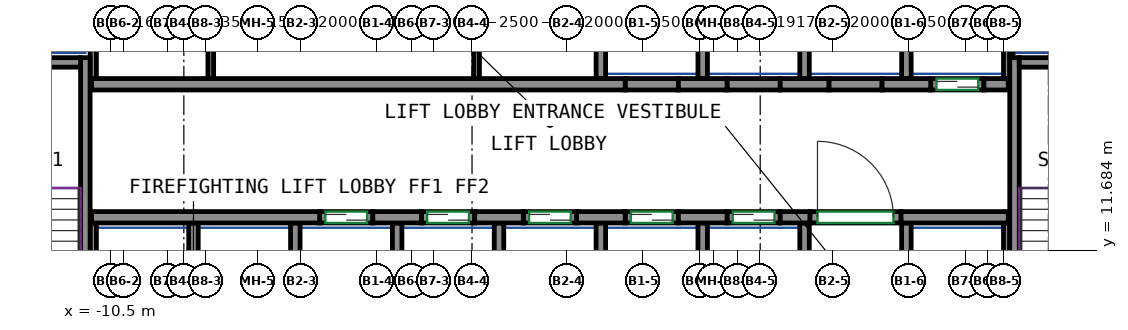
"""IFC4 building model, lengths in metres.
Left out: names, types, materials, properties, quantities, classifications, styles, units other than length and angle.
Written with IfcOpenShell. Run it as: python <this file> out.ifc"""

import sys

from ifc_helpers import new_model, si_unit, direction, frame, frame_2d, origin, place, context, subcontext, project, spatial, rectangle, extrude, source, transform, mapped, element, fill, save


model = new_model("IFC4")
c1 = context("Model", 3, precision=1e-05, world=origin(), true_north=direction((0.0, 1.0)))
c2 = subcontext(c1, "Body", "Model", "MODEL_VIEW")
j1 = project(units=[si_unit("LENGTHUNIT", "METRE"), si_unit("PLANEANGLEUNIT", "RADIAN")], contexts=[c1])
p1 = place(None, origin())
s1 = spatial("IfcSite", under=j1, at=p1, CompositionType="ELEMENT")
p2 = place(p1, origin())
s2 = spatial("IfcBuilding", under=s1, at=p2, CompositionType="ELEMENT")
p3 = place(p2, frame((0.0, 0.0, 185.5)))
s3 = spatial("IfcBuildingStorey", under=s2, at=p3, CompositionType="ELEMENT", Elevation=185.5)
m1 = source(origin(), c2, "Body", "SweptSolid", [
    extrude(rectangle(XDim=7.75, YDim=0.25, at=frame_2d((3.875, 0.0))), origin(), (0.0, 0.0, 1.0), 3.12),
])
p4 = place(p3, frame((-11.175, 9.0, 0.0), z_axis=(0.0, 0.0, 1.0), x_axis=(0.0, 1.0, 0.0)))
e1 = element("IfcWall", 1, at=p4, inside=s3, PredefinedType="SHEAR", context=c2, shape_type="MappedRepresentation", body=[
    mapped(m1, transform((0.0, 0.0, 0.0))),
])
m2 = source(origin(), c2, "Body", "SweptSolid", [
    extrude(rectangle(XDim=3.7, YDim=0.25, at=frame_2d((1.85, 0.0))), origin(), (0.0, 0.0, 1.0), 3.12),
])
p5 = place(p3, frame((-15.0, 16.625, 0.0), z_axis=(0.0, 0.0, 1.0), x_axis=(1.0, 0.0, 0.0)))
e2 = element("IfcWall", 2, at=p5, inside=s3, PredefinedType="SHEAR", context=c2, shape_type="MappedRepresentation", body=[
    mapped(m2, transform((0.0, 0.0, 0.0))),
])
p6 = place(p3, frame((13.275, 9.0, 0.0), z_axis=(0.0, 0.0, 1.0), x_axis=(0.0, 1.0, 0.0)))
e3 = element("IfcWall", 3, at=p6, inside=s3, PredefinedType="SHEAR", context=c2, shape_type="MappedRepresentation", body=[
    mapped(m1, transform((0.0, 0.0, 0.0))),
])
m3 = source(origin(), c2, "Body", "SweptSolid", [
    extrude(rectangle(XDim=3.7, YDim=0.25, at=frame_2d((1.85, 0.0))), origin(), (0.0, 0.0, 1.0), 3.12),
])
p7 = place(p3, frame((13.4, 16.625, 0.0), z_axis=(0.0, 0.0, 1.0), x_axis=(1.0, 0.0, 0.0)))
e4 = element("IfcWall", 4, at=p7, inside=s3, PredefinedType="SHEAR", context=c2, shape_type="MappedRepresentation", body=[
    mapped(m3, transform((0.0, 0.0, 0.0))),
])
m4 = source(origin(), c2, "Body", "SweptSolid", [
    extrude(rectangle(XDim=6.0, YDim=0.3, at=frame_2d((3.0, 0.0))), origin(), (0.0, 0.0, 1.0), 3.12),
])
p8 = place(p3, frame((-11.01, 12.55, 0.0), z_axis=(0.0, 0.0, 1.0), x_axis=(1.0, 0.0, 0.0)))
e5 = element("IfcWall", 5, at=p8, inside=s3, PredefinedType="SHEAR", context=c2, shape_type="MappedRepresentation", body=[
    mapped(m4, transform((0.0, 0.0, 0.0))),
])
m5 = source(origin(), c2, "Body", "SweptSolid", [
    extrude(rectangle(XDim=1.28, YDim=0.3, at=frame_2d((0.64, 0.0))), origin(), (0.0, 0.0, 1.0), 3.12),
])
for number, where, z_axis, x_axis in (
    (6, (-3.61, 12.55, 0.0), (0.0, 0.0, 1.0), (1.0, 0.0, 0.0)),
    (7, (-0.93, 12.55, 0.0), (0.0, 0.0, 1.0), (1.0, 0.0, 0.0)),
    (8, (1.75, 12.55, 0.0), (0.0, 0.0, 1.0), (1.0, 0.0, 0.0)),
    (9, (4.43, 12.55, 0.0), (0.0, 0.0, 1.0), (1.0, 0.0, 0.0)),
):
    element("IfcWall", number, at=place(p3, frame(where, z_axis=z_axis, x_axis=x_axis)), inside=s3, PredefinedType="SHEAR", context=c2, shape_type="MappedRepresentation", body=[
        mapped(m5, transform((0.0, 0.0, 0.0))),
    ])
m6 = source(origin(), c2, "Body", "SweptSolid", [
    extrude(rectangle(XDim=0.78, YDim=0.3, at=frame_2d((0.39, 0.0))), origin(), (0.0, 0.0, 1.0), 3.12),
])
p9 = place(p3, frame((7.11, 12.55, 0.0), z_axis=(0.0, 0.0, 1.0), x_axis=(1.0, 0.0, 0.0)))
e10 = element("IfcWall", 10, at=p9, inside=s3, PredefinedType="SHEAR", context=c2, shape_type="MappedRepresentation", body=[
    mapped(m6, transform((0.0, 0.0, 0.0))),
])
m7 = source(origin(), c2, "Body", "SweptSolid", [
    extrude(rectangle(XDim=2.82, YDim=0.3, at=frame_2d((1.41, 0.0))), origin(), (0.0, 0.0, 1.0), 3.12),
])
p10 = place(p3, frame((10.29, 12.55, 0.0), z_axis=(0.0, 0.0, 1.0), x_axis=(1.0, 0.0, 0.0)))
e11 = element("IfcWall", 11, at=p10, inside=s3, PredefinedType="SHEAR", context=c2, shape_type="MappedRepresentation", body=[
    mapped(m7, transform((0.0, 0.0, 0.0))),
])
m8 = source(origin(), c2, "Body", "SweptSolid", [
    extrude(rectangle(XDim=14.04, YDim=0.3, at=frame_2d((7.02, 0.0))), origin(), (0.0, 0.0, 1.0), 3.12),
])
p11 = place(p3, frame((-11.01, 16.05, 0.0), z_axis=(0.0, 0.0, 1.0), x_axis=(1.0, 0.0, 0.0)))
e12 = element("IfcWall", 12, at=p11, inside=s3, PredefinedType="SHEAR", context=c2, shape_type="MappedRepresentation", body=[
    mapped(m8, transform((0.0, 0.0, 0.0))),
])
p12 = place(p3, frame((4.43, 16.05, 0.0), z_axis=(0.0, 0.0, 1.0), x_axis=(1.0, 0.0, 0.0)))
e13 = element("IfcWall", 13, at=p12, inside=s3, PredefinedType="SHEAR", context=c2, shape_type="MappedRepresentation", body=[
    mapped(m5, transform((0.0, 0.0, 0.0))),
])
m9 = source(origin(), c2, "Body", "SweptSolid", [
    extrude(rectangle(XDim=1.28, YDim=0.3, at=frame_2d((0.64, 0.0))), origin(), (0.0, 0.0, 1.0), 3.12),
])
p13 = place(p3, frame((7.11, 16.05, 0.0), z_axis=(0.0, 0.0, 1.0), x_axis=(1.0, 0.0, 0.0)))
e14 = element("IfcWall", 14, at=p13, inside=s3, PredefinedType="SHEAR", context=c2, shape_type="MappedRepresentation", body=[
    mapped(m9, transform((0.0, 0.0, 0.0))),
])
p14 = place(p3, frame((9.79, 16.05, 0.0), z_axis=(0.0, 0.0, 1.0), x_axis=(1.0, 0.0, 0.0)))
e15 = element("IfcWall", 15, at=p14, inside=s3, PredefinedType="SHEAR", context=c2, shape_type="MappedRepresentation", body=[
    mapped(m5, transform((0.0, 0.0, 0.0))),
])
m10 = source(origin(), c2, "Body", "SweptSolid", [
    extrude(rectangle(XDim=0.64, YDim=0.3, at=frame_2d((0.32, 0.0))), origin(), (0.0, 0.0, 1.0), 3.12),
])
p15 = place(p3, frame((12.47, 16.05, 0.0), z_axis=(0.0, 0.0, 1.0), x_axis=(1.0, 0.0, 0.0)))
e16 = element("IfcWall", 16, at=p15, inside=s3, PredefinedType="SHEAR", context=c2, shape_type="MappedRepresentation", body=[
    mapped(m10, transform((0.0, 0.0, 0.0))),
])
m11 = source(origin(), c2, "Body", "SweptSolid", [
    extrude(rectangle(XDim=1.4, YDim=0.3, at=frame_2d((0.7, 0.0))), origin(), (0.0, 0.0, 1.0), 3.12),
])
p16 = place(p3, frame((-5.01, 12.55, 0.0), z_axis=(0.0, 0.0, 1.0), x_axis=(1.0, 0.0, 0.0)))
e17 = element("IfcWall", 17, at=p16, inside=s3, PredefinedType="PARTITIONING", context=c2, shape_type="MappedRepresentation", body=[
    mapped(m11, transform((0.0, 0.0, 0.0))),
])
p17 = place(p16, frame((0.15, 0.0, 0.0)))
e18 = element("IfcOpeningElement", 18, at=p17, cuts=e17, PredefinedType="OPENING", context=c2, shape_type="SweptSolid", body=[
    extrude(rectangle(XDim=1.1, YDim=2.1, at=frame_2d((0.55, 1.05))), frame((0.0, 0.16, 0.0), z_axis=(0.0, -1.0, 0.0), x_axis=(1.0, 0.0, 0.0)), (0.0, 0.0, 1.0), 0.32),
])
m12 = source(origin(), c2, "Body", "SweptSolid", [
    extrude(rectangle(XDim=1.4, YDim=0.3, at=frame_2d((0.7, 0.0))), origin(), (0.0, 0.0, 1.0), 3.12),
])
p18 = place(p3, frame((-2.33, 12.55, 0.0), z_axis=(0.0, 0.0, 1.0), x_axis=(1.0, 0.0, 0.0)))
e19 = element("IfcWall", 19, at=p18, inside=s3, PredefinedType="PARTITIONING", context=c2, shape_type="MappedRepresentation", body=[
    mapped(m12, transform((0.0, 0.0, 0.0))),
])
p19 = place(p18, frame((0.15, 0.0, 0.0)))
e20 = element("IfcOpeningElement", 20, at=p19, cuts=e19, PredefinedType="OPENING", context=c2, shape_type="SweptSolid", body=[
    extrude(rectangle(XDim=1.1, YDim=2.1, at=frame_2d((0.55, 1.05))), frame((0.0, 0.16, 0.0), z_axis=(0.0, -1.0, 0.0), x_axis=(1.0, 0.0, 0.0)), (0.0, 0.0, 1.0), 0.32),
])
p20 = place(p3, frame((0.35, 12.55, 0.0), z_axis=(0.0, 0.0, 1.0), x_axis=(1.0, 0.0, 0.0)))
e21 = element("IfcWall", 21, at=p20, inside=s3, PredefinedType="PARTITIONING", context=c2, shape_type="MappedRepresentation", body=[
    mapped(m11, transform((0.0, 0.0, 0.0))),
])
p21 = place(p20, frame((0.15, 0.0, 0.0)))
e22 = element("IfcOpeningElement", 22, at=p21, cuts=e21, PredefinedType="OPENING", context=c2, shape_type="SweptSolid", body=[
    extrude(rectangle(XDim=1.1, YDim=2.1, at=frame_2d((0.55, 1.05))), frame((0.0, 0.16, 0.0), z_axis=(0.0, -1.0, 0.0), x_axis=(1.0, 0.0, 0.0)), (0.0, 0.0, 1.0), 0.32),
])
p22 = place(p3, frame((3.03, 12.55, 0.0), z_axis=(0.0, 0.0, 1.0), x_axis=(1.0, 0.0, 0.0)))
e23 = element("IfcWall", 23, at=p22, inside=s3, PredefinedType="PARTITIONING", context=c2, shape_type="MappedRepresentation", body=[
    mapped(m11, transform((0.0, 0.0, 0.0))),
])
p23 = place(p22, frame((0.15, 0.0, 0.0)))
e24 = element("IfcOpeningElement", 24, at=p23, cuts=e23, PredefinedType="OPENING", context=c2, shape_type="SweptSolid", body=[
    extrude(rectangle(XDim=1.1, YDim=2.1, at=frame_2d((0.55, 1.05))), frame((0.0, 0.16, 0.0), z_axis=(0.0, -1.0, 0.0), x_axis=(1.0, 0.0, 0.0)), (0.0, 0.0, 1.0), 0.32),
])
p24 = place(p3, frame((5.71, 12.55, 0.0), z_axis=(0.0, 0.0, 1.0), x_axis=(1.0, 0.0, 0.0)))
e25 = element("IfcWall", 25, at=p24, inside=s3, PredefinedType="PARTITIONING", context=c2, shape_type="MappedRepresentation", body=[
    mapped(m12, transform((0.0, 0.0, 0.0))),
])
p25 = place(p24, frame((0.15, 0.0, 0.0)))
e26 = element("IfcOpeningElement", 26, at=p25, cuts=e25, PredefinedType="OPENING", context=c2, shape_type="SweptSolid", body=[
    extrude(rectangle(XDim=1.1, YDim=2.1, at=frame_2d((0.55, 1.05))), frame((0.0, 0.16, 0.0), z_axis=(0.0, -1.0, 0.0), x_axis=(1.0, 0.0, 0.0)), (0.0, 0.0, 1.0), 0.32),
])
p26 = place(p3, frame((11.07, 16.05, 0.0), z_axis=(0.0, 0.0, 1.0), x_axis=(1.0, 0.0, 0.0)))
e27 = element("IfcWall", 27, at=p26, inside=s3, PredefinedType="PARTITIONING", context=c2, shape_type="MappedRepresentation", body=[
    mapped(m11, transform((0.0, 0.0, 0.0))),
])
p27 = place(p26, frame((0.15, 0.0, 0.0)))
e28 = element("IfcOpeningElement", 28, at=p27, cuts=e27, PredefinedType="OPENING", context=c2, shape_type="SweptSolid", body=[
    extrude(rectangle(XDim=1.1, YDim=2.1, at=frame_2d((0.55, 1.05))), frame((0.0, 0.16, 0.0), z_axis=(0.0, -1.0, 0.0), x_axis=(1.0, 0.0, 0.0)), (0.0, 0.0, 1.0), 0.32),
])
m13 = source(origin(), c2, "Body", "SweptSolid", [
    extrude(rectangle(XDim=2.4, YDim=0.3, at=frame_2d((1.2, 0.0))), origin(), (0.0, 0.0, 1.0), 3.12),
])
p28 = place(p3, frame((7.89, 12.55, 0.0), z_axis=(0.0, 0.0, 1.0), x_axis=(1.0, 0.0, 0.0)))
e29 = element("IfcWall", 29, at=p28, inside=s3, PredefinedType="PARTITIONING", context=c2, shape_type="MappedRepresentation", body=[
    mapped(m13, transform((0.0, 0.0, 0.0))),
])
p29 = place(p28, frame((0.2, 0.0, 0.0)))
e30 = element("IfcOpeningElement", 30, at=p29, cuts=e29, PredefinedType="OPENING", context=c2, shape_type="SweptSolid", body=[
    extrude(rectangle(XDim=2.0, YDim=2.1, at=frame_2d((1.0, 1.05))), frame((0.0, 0.16, 0.0), z_axis=(0.0, -1.0, 0.0), x_axis=(1.0, 0.0, 0.0)), (0.0, 0.0, 1.0), 0.32),
])
p30 = place(p3, frame((3.03, 16.05, 0.0), z_axis=(0.0, 0.0, 1.0), x_axis=(1.0, 0.0, 0.0)))
e31 = element("IfcWall", 31, at=p30, inside=s3, PredefinedType="PARTITIONING", context=c2, shape_type="MappedRepresentation", body=[
    mapped(m11, transform((0.0, 0.0, 0.0))),
])
for number, where, z_axis, x_axis in (
    (32, (5.71, 16.05, 0.0), (0.0, 0.0, 1.0), (1.0, 0.0, 0.0)),
    (33, (8.39, 16.05, 0.0), (0.0, 0.0, 1.0), (1.0, 0.0, 0.0)),
):
    element("IfcWall", number, at=place(p3, frame(where, z_axis=z_axis, x_axis=x_axis)), inside=s3, PredefinedType="PARTITIONING", context=c2, shape_type="MappedRepresentation", body=[
        mapped(m12, transform((0.0, 0.0, 0.0))),
    ])
m14 = source(origin(), c2, "Body", "SweptSolid", [
    extrude(rectangle(XDim=3.275, YDim=0.165, at=frame_2d((1.638, 0.0))), origin(), (0.0, 0.0, 1.0), 3.12),
])
p31 = place(p3, frame((13.067, 16.2, 0.0), z_axis=(0.0, 0.0, 1.0), x_axis=(0.0, 1.0, 0.0)))
e34 = element("IfcWall", 34, at=p31, inside=s3, PredefinedType="PARTITIONING", context=c2, shape_type="MappedRepresentation", body=[
    mapped(m14, transform((0.0, 0.0, 0.0))),
])
m15 = source(origin(), c2, "Body", "SweptSolid", [
    extrude(rectangle(XDim=4.8, YDim=0.165, at=frame_2d((2.4, 0.0))), origin(), (0.0, 0.0, 1.0), 3.12),
])
p32 = place(p3, frame((-10.968, 16.2, 0.0), z_axis=(0.0, 0.0, 1.0), x_axis=(0.0, 1.0, 0.0)))
e35 = element("IfcWall", 35, at=p32, inside=s3, PredefinedType="PARTITIONING", context=c2, shape_type="MappedRepresentation", body=[
    mapped(m15, transform((0.0, 0.0, 0.0))),
])
m16 = source(origin(), c2, "Body", "SweptSolid", [
    extrude(rectangle(XDim=3.275, YDim=0.25, at=frame_2d((1.638, 0.0))), origin(), (0.0, 0.0, 1.0), 3.12),
])
p33 = place(p3, frame((10.43, 16.2, 0.0), z_axis=(0.0, 0.0, 1.0), x_axis=(0.0, 1.0, 0.0)))
e36 = element("IfcWall", 36, at=p33, inside=s3, PredefinedType="PARTITIONING", context=c2, shape_type="MappedRepresentation", body=[
    mapped(m16, transform((0.0, 0.0, 0.0))),
])
m17 = source(origin(), c2, "Body", "SweptSolid", [
    extrude(rectangle(XDim=2.725, YDim=0.085, at=frame_2d((1.363, 0.0))), origin(), (0.0, 0.0, 1.0), 3.12),
])
p34 = place(p3, frame((13.192, 16.75, 0.0), z_axis=(0.0, 0.0, 1.0), x_axis=(0.0, 1.0, 0.0)))
e37 = element("IfcWall", 37, at=p34, inside=s3, PredefinedType="PARTITIONING", context=c2, shape_type="MappedRepresentation", body=[
    mapped(m17, transform((0.0, 0.0, 0.0))),
])
for number, where, z_axis, x_axis in (
    (38, (2.39, 16.2, 0.0), (0.0, 0.0, 1.0), (0.0, 1.0, 0.0)),
    (39, (5.07, 16.2, 0.0), (0.0, 0.0, 1.0), (0.0, 1.0, 0.0)),
    (40, (7.75, 16.2, 0.0), (0.0, 0.0, 1.0), (0.0, 1.0, 0.0)),
):
    element("IfcWall", number, at=place(p3, frame(where, z_axis=z_axis, x_axis=x_axis)), inside=s3, PredefinedType="PARTITIONING", context=c2, shape_type="MappedRepresentation", body=[
        mapped(m16, transform((0.0, 0.0, 0.0))),
    ])
m18 = source(origin(), c2, "Body", "SweptSolid", [
    extrude(rectangle(XDim=3.4, YDim=0.25, at=frame_2d((1.7, 0.0))), origin(), (0.0, 0.0, 1.0), 3.12),
])
p35 = place(p3, frame((10.43, 9.0, 0.0), z_axis=(0.0, 0.0, 1.0), x_axis=(0.0, 1.0, 0.0)))
e41 = element("IfcWall", 41, at=p35, inside=s3, PredefinedType="PARTITIONING", context=c2, shape_type="MappedRepresentation", body=[
    mapped(m18, transform((0.0, 0.0, 0.0))),
])
m19 = source(origin(), c2, "Body", "SweptSolid", [
    extrude(rectangle(XDim=3.4, YDim=0.165, at=frame_2d((1.7, 0.0))), origin(), (0.0, 0.0, 1.0), 3.12),
])
p36 = place(p3, frame((13.067, 9.0, 0.0), z_axis=(0.0, 0.0, 1.0), x_axis=(0.0, 1.0, 0.0)))
e42 = element("IfcWall", 42, at=p36, inside=s3, PredefinedType="PARTITIONING", context=c2, shape_type="MappedRepresentation", body=[
    mapped(m19, transform((0.0, 0.0, 0.0))),
])
for number, where, z_axis, x_axis in (
    (43, (2.39, 9.0, 0.0), (0.0, 0.0, 1.0), (0.0, 1.0, 0.0)),
    (44, (5.07, 9.0, 0.0), (0.0, 0.0, 1.0), (0.0, 1.0, 0.0)),
    (45, (7.75, 9.0, 0.0), (0.0, 0.0, 1.0), (0.0, 1.0, 0.0)),
    (46, (-0.29, 9.0, 0.0), (0.0, 0.0, 1.0), (0.0, 1.0, 0.0)),
):
    element("IfcWall", number, at=place(p3, frame(where, z_axis=z_axis, x_axis=x_axis)), inside=s3, PredefinedType="PARTITIONING", context=c2, shape_type="MappedRepresentation", body=[
        mapped(m18, transform((0.0, 0.0, 0.0))),
    ])
p37 = place(p3, frame((-10.968, 9.0, 0.0), z_axis=(0.0, 0.0, 1.0), x_axis=(0.0, 1.0, 0.0)))
e47 = element("IfcWall", 47, at=p37, inside=s3, PredefinedType="PARTITIONING", context=c2, shape_type="MappedRepresentation", body=[
    mapped(m19, transform((0.0, 0.0, 0.0))),
])
for number, where, z_axis, x_axis in (
    (48, (-2.97, 9.0, 0.0), (0.0, 0.0, 1.0), (0.0, 1.0, 0.0)),
    (49, (-5.65, 9.0, 0.0), (0.0, 0.0, 1.0), (0.0, 1.0, 0.0)),
    (50, (-8.33, 9.0, 0.0), (0.0, 0.0, 1.0), (0.0, 1.0, 0.0)),
):
    element("IfcWall", number, at=place(p3, frame(where, z_axis=z_axis, x_axis=x_axis)), inside=s3, PredefinedType="PARTITIONING", context=c2, shape_type="MappedRepresentation", body=[
        mapped(m18, transform((0.0, 0.0, 0.0))),
    ])
m20 = source(origin(), c2, "Body", "SweptSolid", [
    extrude(rectangle(XDim=4.8, YDim=0.15, at=frame_2d((2.4, 0.0))), origin(), (0.0, 0.0, 1.0), 3.12),
])
for number, where, z_axis, x_axis in (
    (51, (-7.875, 16.2, 0.0), (0.0, 0.0, 1.0), (0.0, 1.0, 0.0)),
    (52, (-0.88, 16.2, 0.0), (0.0, 0.0, 1.0), (0.0, 1.0, 0.0)),
):
    element("IfcWall", number, at=place(p3, frame(where, z_axis=z_axis, x_axis=x_axis)), inside=s3, PredefinedType="PARTITIONING", context=c2, shape_type="MappedRepresentation", body=[
        mapped(m20, transform((0.0, 0.0, 0.0))),
    ])
p38 = place(p29, origin())
e53 = element("IfcDoor", 53, at=p38, inside=s3, OperationType="DOUBLE_DOOR_SINGLE_SWING", PredefinedType="DOOR", context=c2, shape_type="SweptSolid", body=[
    extrude(rectangle(XDim=2.0, YDim=2.1, at=frame_2d((1.0, 1.05))), frame((0.0, 0.025, 0.0), z_axis=(0.0, -1.0, 0.0), x_axis=(1.0, 0.0, 0.0)), (0.0, 0.0, 1.0), 0.05),
])
fill(e30, e53)
p39 = place(p17, origin())
e54 = element("IfcDoor", 54, at=p39, inside=s3, OperationType="DOUBLE_DOOR_SLIDING", PredefinedType="DOOR", context=c2, shape_type="SweptSolid", body=[
    extrude(rectangle(XDim=1.1, YDim=2.1, at=frame_2d((0.55, 1.05))), frame((0.0, 0.025, 0.0), z_axis=(0.0, -1.0, 0.0), x_axis=(1.0, 0.0, 0.0)), (0.0, 0.0, 1.0), 0.05),
])
fill(e18, e54)
p40 = place(p19, origin())
e55 = element("IfcDoor", 55, at=p40, inside=s3, OperationType="DOUBLE_DOOR_SLIDING", PredefinedType="DOOR", context=c2, shape_type="SweptSolid", body=[
    extrude(rectangle(XDim=1.1, YDim=2.1, at=frame_2d((0.55, 1.05))), frame((0.0, 0.025, 0.0), z_axis=(0.0, -1.0, 0.0), x_axis=(1.0, 0.0, 0.0)), (0.0, 0.0, 1.0), 0.05),
])
fill(e20, e55)
p41 = place(p21, origin())
e56 = element("IfcDoor", 56, at=p41, inside=s3, OperationType="DOUBLE_DOOR_SLIDING", PredefinedType="DOOR", context=c2, shape_type="SweptSolid", body=[
    extrude(rectangle(XDim=1.1, YDim=2.1, at=frame_2d((0.55, 1.05))), frame((0.0, 0.025, 0.0), z_axis=(0.0, -1.0, 0.0), x_axis=(1.0, 0.0, 0.0)), (0.0, 0.0, 1.0), 0.05),
])
fill(e22, e56)
p42 = place(p23, origin())
e57 = element("IfcDoor", 57, at=p42, inside=s3, OperationType="DOUBLE_DOOR_SLIDING", PredefinedType="DOOR", context=c2, shape_type="SweptSolid", body=[
    extrude(rectangle(XDim=1.1, YDim=2.1, at=frame_2d((0.55, 1.05))), frame((0.0, 0.025, 0.0), z_axis=(0.0, -1.0, 0.0), x_axis=(1.0, 0.0, 0.0)), (0.0, 0.0, 1.0), 0.05),
])
fill(e24, e57)
p43 = place(p25, origin())
e58 = element("IfcDoor", 58, at=p43, inside=s3, OperationType="DOUBLE_DOOR_SLIDING", PredefinedType="DOOR", context=c2, shape_type="SweptSolid", body=[
    extrude(rectangle(XDim=1.1, YDim=2.1, at=frame_2d((0.55, 1.05))), frame((0.0, 0.025, 0.0), z_axis=(0.0, -1.0, 0.0), x_axis=(1.0, 0.0, 0.0)), (0.0, 0.0, 1.0), 0.05),
])
fill(e26, e58)
p44 = place(p27, origin())
e59 = element("IfcDoor", 59, at=p44, inside=s3, OperationType="DOUBLE_DOOR_SLIDING", PredefinedType="DOOR", context=c2, shape_type="SweptSolid", body=[
    extrude(rectangle(XDim=1.1, YDim=2.1, at=frame_2d((0.55, 1.05))), frame((0.0, 0.025, 0.0), z_axis=(0.0, -1.0, 0.0), x_axis=(1.0, 0.0, 0.0)), (0.0, 0.0, 1.0), 0.05),
])
fill(e28, e59)
save(model, sys.argv[1])
